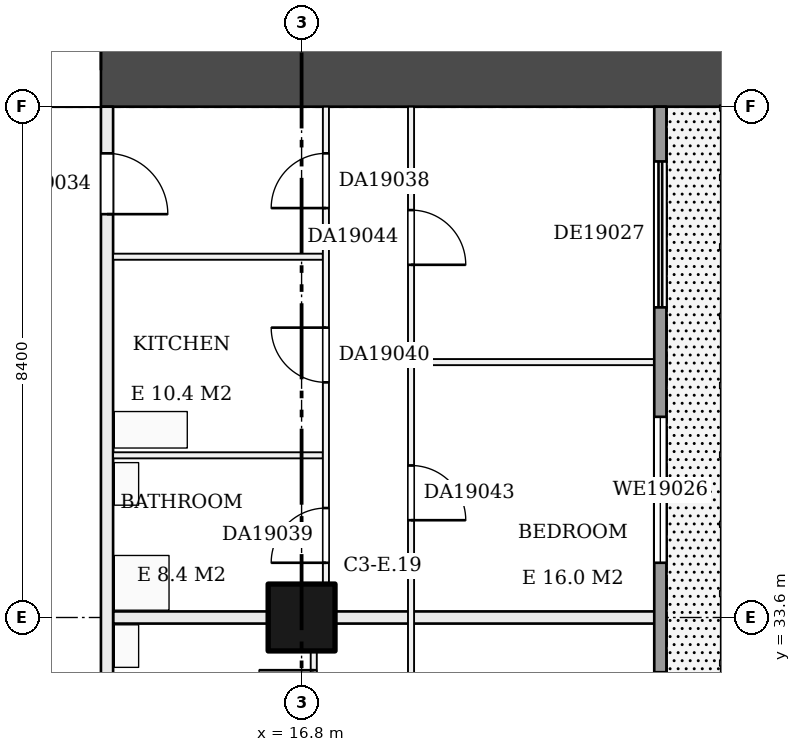
"""IFC4 building model, lengths in metres.
Left out: names, types, materials, properties, quantities, classifications, styles, units other than length and angle.
Written with IfcOpenShell. Run it as: python <this file> out.ifc"""

import sys

from ifc_helpers import new_model, si_unit, direction, frame, frame_2d, origin, origin_2d, place, context, subcontext, project, spatial, rectangle, extrude, element, fill, save


model = new_model("IFC4")
c1 = context("Model", 3, precision=1e-05, world=origin(), true_north=direction((0.0, 1.0)))
c2 = subcontext(c1, "Body", "Model", "MODEL_VIEW")
j1 = project(units=[si_unit("LENGTHUNIT", "METRE"), si_unit("PLANEANGLEUNIT", "RADIAN")], contexts=[c1])
p1 = place(None, origin())
s1 = spatial("IfcSite", under=j1, at=p1, CompositionType="ELEMENT")
p2 = place(p1, origin())
s2 = spatial("IfcBuilding", under=s1, at=p2, CompositionType="ELEMENT")
p3 = place(p2, frame((0.0, 0.0, 81.2)))
s3 = spatial("IfcBuildingStorey", under=s2, at=p3, CompositionType="ELEMENT", Elevation=81.2)
p4 = place(p3, frame((16.8, 33.6, 0.0), z_axis=(0.0, 0.0, 1.0), x_axis=(1.0, 0.0, 0.0)))
e1 = element("IfcColumn", 1, at=p4, inside=s3, PredefinedType="COLUMN", context=c2, shape_type="SweptSolid", body=[
    extrude(rectangle(XDim=1.1, YDim=1.1, at=origin_2d()), origin(), (0.0, 0.0, 1.0), 3.22),
])
p5 = place(p3, frame((9.6, 42.6, 0.0), z_axis=(0.0, 0.0, 1.0), x_axis=(1.0, 0.0, 0.0)))
e2 = element("IfcWall", 2, at=p5, inside=s3, PredefinedType="SHEAR", context=c2, shape_type="SweptSolid", body=[
    extrude(rectangle(XDim=14.4, YDim=1.2, at=frame_2d((7.2, 0.0))), origin(), (0.0, 0.0, 1.0), 3.22),
])
p6 = place(p5, frame((2.1, 0.0, 0.0)))
e3 = element("IfcOpeningElement", 3, at=p6, cuts=e2, PredefinedType="OPENING", context=c2, shape_type="SweptSolid", body=[
    extrude(rectangle(XDim=1.8, YDim=2.1, at=frame_2d((0.9, 1.05))), frame((0.0, 0.61, 0.0), z_axis=(0.0, -1.0, 0.0), x_axis=(1.0, 0.0, 0.0)), (0.0, 0.0, 1.0), 1.22),
])
p7 = place(p3, frame((13.7, 33.6, 0.0), z_axis=(0.0, 0.0, 1.0), x_axis=(1.0, 0.0, 0.0)))
e4 = element("IfcWall", 4, at=p7, inside=s3, PredefinedType="PARTITIONING", context=c2, shape_type="SweptSolid", body=[
    extrude(rectangle(XDim=9.0, YDim=0.2, at=frame_2d((4.5, 0.0))), origin(), (0.0, 0.0, 1.0), 3.22),
])
p8 = place(p3, frame((13.7, 36.267, 0.0), z_axis=(0.0, 0.0, 1.0), x_axis=(1.0, 0.0, 0.0)))
e5 = element("IfcWall", 5, at=p8, inside=s3, PredefinedType="PARTITIONING", context=c2, shape_type="SweptSolid", body=[
    extrude(rectangle(XDim=3.45, YDim=0.1, at=frame_2d((1.725, 0.0))), origin(), (0.0, 0.0, 1.0), 3.22),
])
p9 = place(p3, frame((18.65, 37.8, 0.0), z_axis=(0.0, 0.0, 1.0), x_axis=(1.0, 0.0, 0.0)))
e6 = element("IfcWall", 6, at=p9, inside=s3, PredefinedType="PARTITIONING", context=c2, shape_type="SweptSolid", body=[
    extrude(rectangle(XDim=4.05, YDim=0.1, at=frame_2d((2.025, 0.0))), origin(), (0.0, 0.0, 1.0), 3.22),
])
p10 = place(p3, frame((13.7, 39.533, 0.0), z_axis=(0.0, 0.0, 1.0), x_axis=(1.0, 0.0, 0.0)))
e7 = element("IfcWall", 7, at=p10, inside=s3, PredefinedType="PARTITIONING", context=c2, shape_type="SweptSolid", body=[
    extrude(rectangle(XDim=3.45, YDim=0.1, at=frame_2d((1.725, 0.0))), origin(), (0.0, 0.0, 1.0), 3.22),
])
p11 = place(p3, frame((13.6, 23.0, 0.0), z_axis=(0.0, 0.0, 1.0), x_axis=(0.0, 1.0, 0.0)))
e8 = element("IfcWall", 8, at=p11, inside=s3, PredefinedType="PARTITIONING", context=c2, shape_type="SweptSolid", body=[
    extrude(rectangle(XDim=19.0, YDim=0.2, at=frame_2d((9.5, 0.0))), origin(), (0.0, 0.0, 1.0), 3.22),
])
p12 = place(p11, frame((6.167, 0.0, 0.0)))
e9 = element("IfcOpeningElement", 9, at=p12, cuts=e8, PredefinedType="OPENING", context=c2, shape_type="SweptSolid", body=[
    extrude(rectangle(XDim=1.0, YDim=2.1, at=frame_2d((0.5, 1.05))), frame((0.0, 0.11, 0.0), z_axis=(0.0, -1.0, 0.0), x_axis=(1.0, 0.0, 0.0)), (0.0, 0.0, 1.0), 0.22),
])
p13 = place(p11, frame((17.233, 0.0, 0.0)))
e10 = element("IfcOpeningElement", 10, at=p13, cuts=e8, PredefinedType="OPENING", context=c2, shape_type="SweptSolid", body=[
    extrude(rectangle(XDim=1.0, YDim=2.1, at=frame_2d((0.5, 1.05))), frame((0.0, 0.11, 0.0), z_axis=(0.0, -1.0, 0.0), x_axis=(1.0, 0.0, 0.0)), (0.0, 0.0, 1.0), 0.22),
])
p14 = place(p3, frame((17.0, 25.3, 0.0), z_axis=(0.0, 0.0, 1.0), x_axis=(0.0, 1.0, 0.0)))
e11 = element("IfcWall", 11, at=p14, inside=s3, PredefinedType="PARTITIONING", context=c2, shape_type="SweptSolid", body=[
    extrude(rectangle(XDim=8.2, YDim=0.1, at=frame_2d((4.1, 0.0))), origin(), (0.0, 0.0, 1.0), 3.22),
])
p15 = place(p14, frame((3.967, 0.0, 0.0)))
e12 = element("IfcOpeningElement", 12, at=p15, cuts=e11, PredefinedType="OPENING", context=c2, shape_type="SweptSolid", body=[
    extrude(rectangle(XDim=0.9, YDim=2.1, at=frame_2d((0.45, 1.05))), frame((0.0, 0.06, 0.0), z_axis=(0.0, -1.0, 0.0), x_axis=(1.0, 0.0, 0.0)), (0.0, 0.0, 1.0), 0.12),
])
p16 = place(p14, frame((1.1, 0.0, 0.0)))
e13 = element("IfcOpeningElement", 13, at=p16, cuts=e11, PredefinedType="OPENING", context=c2, shape_type="SweptSolid", body=[
    extrude(rectangle(XDim=0.9, YDim=2.1, at=frame_2d((0.45, 1.05))), frame((0.0, 0.06, 0.0), z_axis=(0.0, -1.0, 0.0), x_axis=(1.0, 0.0, 0.0)), (0.0, 0.0, 1.0), 0.12),
])
p17 = place(p14, frame((6.533, 0.0, 0.0)))
e14 = element("IfcOpeningElement", 14, at=p17, cuts=e11, PredefinedType="OPENING", context=c2, shape_type="SweptSolid", body=[
    extrude(rectangle(XDim=0.9, YDim=2.1, at=frame_2d((0.45, 1.05))), frame((0.0, 0.06, 0.0), z_axis=(0.0, -1.0, 0.0), x_axis=(1.0, 0.0, 0.0)), (0.0, 0.0, 1.0), 0.12),
])
p18 = place(p3, frame((17.2, 33.7, 0.0), z_axis=(0.0, 0.0, 1.0), x_axis=(0.0, 1.0, 0.0)))
e15 = element("IfcWall", 15, at=p18, inside=s3, PredefinedType="PARTITIONING", context=c2, shape_type="SweptSolid", body=[
    extrude(rectangle(XDim=8.3, YDim=0.1, at=frame_2d((4.15, 0.0))), origin(), (0.0, 0.0, 1.0), 3.22),
])
p19 = place(p18, frame((6.633, 0.0, 0.0)))
e16 = element("IfcOpeningElement", 16, at=p19, cuts=e15, PredefinedType="OPENING", context=c2, shape_type="SweptSolid", body=[
    extrude(rectangle(XDim=0.9, YDim=2.1, at=frame_2d((0.45, 1.05))), frame((0.0, 0.06, 0.0), z_axis=(0.0, -1.0, 0.0), x_axis=(1.0, 0.0, 0.0)), (0.0, 0.0, 1.0), 0.12),
])
p20 = place(p18, frame((0.8, 0.0, 0.0)))
e17 = element("IfcOpeningElement", 17, at=p20, cuts=e15, PredefinedType="OPENING", context=c2, shape_type="SweptSolid", body=[
    extrude(rectangle(XDim=0.9, YDim=2.1, at=frame_2d((0.45, 1.05))), frame((0.0, 0.06, 0.0), z_axis=(0.0, -1.0, 0.0), x_axis=(1.0, 0.0, 0.0)), (0.0, 0.0, 1.0), 0.12),
])
p21 = place(p18, frame((3.767, 0.0, 0.0)))
e18 = element("IfcOpeningElement", 18, at=p21, cuts=e15, PredefinedType="OPENING", context=c2, shape_type="SweptSolid", body=[
    extrude(rectangle(XDim=0.9, YDim=2.1, at=frame_2d((0.45, 1.05))), frame((0.0, 0.06, 0.0), z_axis=(0.0, -1.0, 0.0), x_axis=(1.0, 0.0, 0.0)), (0.0, 0.0, 1.0), 0.12),
])
p22 = place(p3, frame((18.6, 25.3, 0.0), z_axis=(0.0, 0.0, 1.0), x_axis=(0.0, 1.0, 0.0)))
e19 = element("IfcWall", 19, at=p22, inside=s3, PredefinedType="PARTITIONING", context=c2, shape_type="SweptSolid", body=[
    extrude(rectangle(XDim=16.7, YDim=0.1, at=frame_2d((8.35, 0.0))), origin(), (0.0, 0.0, 1.0), 3.22),
])
p23 = place(p22, frame((1.5, 0.0, 0.0)))
e20 = element("IfcOpeningElement", 20, at=p23, cuts=e19, PredefinedType="OPENING", context=c2, shape_type="SweptSolid", body=[
    extrude(rectangle(XDim=0.9, YDim=2.1, at=frame_2d((0.45, 1.05))), frame((0.0, 0.06, 0.0), z_axis=(0.0, -1.0, 0.0), x_axis=(1.0, 0.0, 0.0)), (0.0, 0.0, 1.0), 0.12),
])
p24 = place(p22, frame((5.7, 0.0, 0.0)))
e21 = element("IfcOpeningElement", 21, at=p24, cuts=e19, PredefinedType="OPENING", context=c2, shape_type="SweptSolid", body=[
    extrude(rectangle(XDim=0.9, YDim=2.1, at=frame_2d((0.45, 1.05))), frame((0.0, 0.06, 0.0), z_axis=(0.0, -1.0, 0.0), x_axis=(1.0, 0.0, 0.0)), (0.0, 0.0, 1.0), 0.12),
])
p25 = place(p22, frame((9.9, 0.0, 0.0)))
e22 = element("IfcOpeningElement", 22, at=p25, cuts=e19, PredefinedType="OPENING", context=c2, shape_type="SweptSolid", body=[
    extrude(rectangle(XDim=0.9, YDim=2.1, at=frame_2d((0.45, 1.05))), frame((0.0, 0.06, 0.0), z_axis=(0.0, -1.0, 0.0), x_axis=(1.0, 0.0, 0.0)), (0.0, 0.0, 1.0), 0.12),
])
p26 = place(p22, frame((14.1, 0.0, 0.0)))
e23 = element("IfcOpeningElement", 23, at=p26, cuts=e19, PredefinedType="OPENING", context=c2, shape_type="SweptSolid", body=[
    extrude(rectangle(XDim=0.9, YDim=2.1, at=frame_2d((0.45, 1.05))), frame((0.0, 0.06, 0.0), z_axis=(0.0, -1.0, 0.0), x_axis=(1.0, 0.0, 0.0)), (0.0, 0.0, 1.0), 0.12),
])
p27 = place(p3, frame((22.7, 25.2, 0.0), z_axis=(0.0, 0.0, 1.0), x_axis=(0.0, 1.0, 0.0)))
e24 = element("IfcWall", 24, at=p27, inside=s3, PredefinedType="SOLIDWALL", context=c2, shape_type="SweptSolid", body=[
    extrude(rectangle(XDim=16.8, YDim=0.2, at=frame_2d((8.4, 0.0))), origin(), (0.0, 0.0, 1.0), 3.22),
])
p28 = place(p27, frame((0.9, 0.0, 0.0)))
e25 = element("IfcOpeningElement", 25, at=p28, cuts=e24, PredefinedType="OPENING", context=c2, shape_type="SweptSolid", body=[
    extrude(rectangle(XDim=2.4, YDim=2.2, at=frame_2d((1.2, 1.1))), frame((0.0, 0.11, 0.0), z_axis=(0.0, -1.0, 0.0), x_axis=(1.0, 0.0, 0.0)), (0.0, 0.0, 1.0), 0.22),
])
p29 = place(p27, frame((5.1, 0.0, 0.9)))
e26 = element("IfcOpeningElement", 26, at=p29, cuts=e24, PredefinedType="OPENING", context=c2, shape_type="SweptSolid", body=[
    extrude(rectangle(XDim=2.4, YDim=1.5, at=frame_2d((1.2, 0.75))), frame((0.0, 0.11, 0.0), z_axis=(0.0, -1.0, 0.0), x_axis=(1.0, 0.0, 0.0)), (0.0, 0.0, 1.0), 0.22),
])
p30 = place(p27, frame((9.3, 0.0, 0.9)))
e27 = element("IfcOpeningElement", 27, at=p30, cuts=e24, PredefinedType="OPENING", context=c2, shape_type="SweptSolid", body=[
    extrude(rectangle(XDim=2.4, YDim=1.5, at=frame_2d((1.2, 0.75))), frame((0.0, 0.11, 0.0), z_axis=(0.0, -1.0, 0.0), x_axis=(1.0, 0.0, 0.0)), (0.0, 0.0, 1.0), 0.22),
])
p31 = place(p27, frame((13.5, 0.0, 0.0)))
e28 = element("IfcOpeningElement", 28, at=p31, cuts=e24, PredefinedType="OPENING", context=c2, shape_type="SweptSolid", body=[
    extrude(rectangle(XDim=2.4, YDim=2.2, at=frame_2d((1.2, 1.1))), frame((0.0, 0.11, 0.0), z_axis=(0.0, -1.0, 0.0), x_axis=(1.0, 0.0, 0.0)), (0.0, 0.0, 1.0), 0.22),
])
p32 = place(p6, origin())
e29 = element("IfcDoor", 29, at=p32, inside=s3, OperationType="DOUBLE_DOOR_SINGLE_SWING", PredefinedType="DOOR", context=c2, shape_type="SweptSolid", body=[
    extrude(rectangle(XDim=1.8, YDim=2.1, at=frame_2d((0.9, 1.05))), frame((0.0, 0.025, 0.0), z_axis=(0.0, -1.0, 0.0), x_axis=(1.0, 0.0, 0.0)), (0.0, 0.0, 1.0), 0.05),
])
fill(e3, e29)
p33 = place(p13, frame((1.0, 0.0, 0.0), z_axis=(0.0, 0.0, 1.0), x_axis=(-1.0, 0.0, 0.0)))
e30 = element("IfcDoor", 30, at=p33, inside=s3, OperationType="SINGLE_SWING_RIGHT", PredefinedType="DOOR", context=c2, shape_type="SweptSolid", body=[
    extrude(rectangle(XDim=1.0, YDim=2.1, at=frame_2d((0.5, 1.05))), frame((0.0, 0.025, 0.0), z_axis=(0.0, -1.0, 0.0), x_axis=(1.0, 0.0, 0.0)), (0.0, 0.0, 1.0), 0.05),
])
fill(e10, e30)
p34 = place(p17, origin())
e31 = element("IfcDoor", 31, at=p34, inside=s3, OperationType="SINGLE_SWING_RIGHT", PredefinedType="DOOR", context=c2, shape_type="SweptSolid", body=[
    extrude(rectangle(XDim=0.9, YDim=2.1, at=frame_2d((0.45, 1.05))), frame((0.0, 0.025, 0.0), z_axis=(0.0, -1.0, 0.0), x_axis=(1.0, 0.0, 0.0)), (0.0, 0.0, 1.0), 0.05),
])
fill(e14, e31)
p35 = place(p19, origin())
e32 = element("IfcDoor", 32, at=p35, inside=s3, OperationType="SINGLE_SWING_LEFT", PredefinedType="DOOR", context=c2, shape_type="SweptSolid", body=[
    extrude(rectangle(XDim=0.9, YDim=2.1, at=frame_2d((0.45, 1.05))), frame((0.0, 0.025, 0.0), z_axis=(0.0, -1.0, 0.0), x_axis=(1.0, 0.0, 0.0)), (0.0, 0.0, 1.0), 0.05),
])
fill(e16, e32)
p36 = place(p20, origin())
e33 = element("IfcDoor", 33, at=p36, inside=s3, OperationType="SINGLE_SWING_LEFT", PredefinedType="DOOR", context=c2, shape_type="SweptSolid", body=[
    extrude(rectangle(XDim=0.9, YDim=2.1, at=frame_2d((0.45, 1.05))), frame((0.0, 0.025, 0.0), z_axis=(0.0, -1.0, 0.0), x_axis=(1.0, 0.0, 0.0)), (0.0, 0.0, 1.0), 0.05),
])
fill(e17, e33)
p37 = place(p21, origin())
e34 = element("IfcDoor", 34, at=p37, inside=s3, OperationType="SINGLE_SWING_RIGHT", PredefinedType="DOOR", context=c2, shape_type="SweptSolid", body=[
    extrude(rectangle(XDim=0.9, YDim=2.1, at=frame_2d((0.45, 1.05))), frame((0.0, 0.025, 0.0), z_axis=(0.0, -1.0, 0.0), x_axis=(1.0, 0.0, 0.0)), (0.0, 0.0, 1.0), 0.05),
])
fill(e18, e34)
p38 = place(p25, frame((0.9, 0.0, 0.0), z_axis=(0.0, 0.0, 1.0), x_axis=(-1.0, 0.0, 0.0)))
e35 = element("IfcDoor", 35, at=p38, inside=s3, OperationType="SINGLE_SWING_RIGHT", PredefinedType="DOOR", context=c2, shape_type="SweptSolid", body=[
    extrude(rectangle(XDim=0.9, YDim=2.1, at=frame_2d((0.45, 1.05))), frame((0.0, 0.025, 0.0), z_axis=(0.0, -1.0, 0.0), x_axis=(1.0, 0.0, 0.0)), (0.0, 0.0, 1.0), 0.05),
])
fill(e22, e35)
p39 = place(p26, frame((0.9, 0.0, 0.0), z_axis=(0.0, 0.0, 1.0), x_axis=(-1.0, 0.0, 0.0)))
e36 = element("IfcDoor", 36, at=p39, inside=s3, OperationType="SINGLE_SWING_RIGHT", PredefinedType="DOOR", context=c2, shape_type="SweptSolid", body=[
    extrude(rectangle(XDim=0.9, YDim=2.1, at=frame_2d((0.45, 1.05))), frame((0.0, 0.025, 0.0), z_axis=(0.0, -1.0, 0.0), x_axis=(1.0, 0.0, 0.0)), (0.0, 0.0, 1.0), 0.05),
])
fill(e23, e36)
p40 = place(p30, origin())
e37 = element("IfcWindow", 37, at=p40, inside=s3, PartitioningType="SINGLE_PANEL", PredefinedType="WINDOW", context=c2, shape_type="SweptSolid", body=[
    extrude(rectangle(XDim=2.4, YDim=1.5, at=frame_2d((1.2, 0.75))), frame((0.0, 0.03, 0.0), z_axis=(0.0, -1.0, 0.0), x_axis=(1.0, 0.0, 0.0)), (0.0, 0.0, 1.0), 0.06),
])
fill(e27, e37)
p41 = place(p31, origin())
e38 = element("IfcDoor", 38, at=p41, inside=s3, OperationType="DOUBLE_DOOR_SLIDING", PredefinedType="DOOR", context=c2, shape_type="SweptSolid", body=[
    extrude(rectangle(XDim=2.4, YDim=2.2, at=frame_2d((1.2, 1.1))), frame((0.0, 0.025, 0.0), z_axis=(0.0, -1.0, 0.0), x_axis=(1.0, 0.0, 0.0)), (0.0, 0.0, 1.0), 0.05),
])
fill(e28, e38)
save(model, sys.argv[1])
